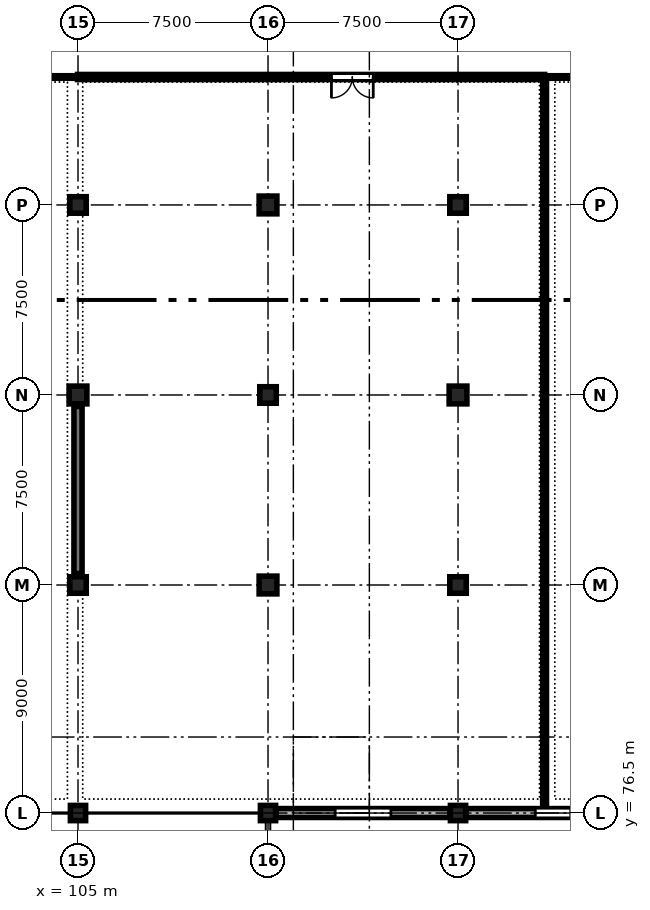
"""IFC4 building model, lengths in metres.
Left out: names, types, materials, properties, quantities, classifications, styles, units other than length and angle.
Written with IfcOpenShell. Run it as: python <this file> out.ifc"""

import sys

from ifc_helpers import new_model, si_unit, direction, frame, frame_2d, origin, origin_2d, place, context, subcontext, project, spatial, rectangle, circle, extrude, element, fill, save


model = new_model("IFC4")
c1 = context("Model", 3, precision=1e-05, world=origin(), true_north=direction((0.0, 1.0)))
c2 = subcontext(c1, "Body", "Model", "MODEL_VIEW")
j1 = project(units=[si_unit("LENGTHUNIT", "METRE"), si_unit("PLANEANGLEUNIT", "RADIAN")], contexts=[c1])
p1 = place(None, origin())
s1 = spatial("IfcSite", under=j1, at=p1, CompositionType="ELEMENT")
p2 = place(p1, origin())
s2 = spatial("IfcBuilding", under=s1, at=p2, CompositionType="ELEMENT")
p3 = place(p2, frame((0.0, 0.0, 4.8)))
s3 = spatial("IfcBuildingStorey", under=s2, at=p3, CompositionType="ELEMENT", Elevation=4.8)
p4 = place(p3, frame((105.0, 76.5, 0.0), z_axis=(0.0, 0.0, 1.0), x_axis=(1.0, 0.0, 0.0)))
e1 = element("IfcColumn", 1, at=p4, inside=s3, PredefinedType="COLUMN", context=c2, shape_type="SweptSolid", body=[
    extrude(circle(Radius=0.3, at=origin_2d()), origin(), (0.0, 0.0, 1.0), 4.5),
])
p5 = place(p3, frame((105.0, 85.5, 0.0), z_axis=(0.0, 0.0, 1.0), x_axis=(1.0, 0.0, 0.0)))
e2 = element("IfcColumn", 2, at=p5, inside=s3, PredefinedType="COLUMN", context=c2, shape_type="SweptSolid", body=[
    extrude(rectangle(XDim=0.65, YDim=0.65, at=origin_2d()), origin(), (0.0, 0.0, 1.0), 4.5),
])
p6 = place(p3, frame((105.0, 93.0, 0.0), z_axis=(0.0, 0.0, 1.0), x_axis=(1.0, 0.0, 0.0)))
e3 = element("IfcColumn", 3, at=p6, inside=s3, PredefinedType="COLUMN", context=c2, shape_type="SweptSolid", body=[
    extrude(rectangle(XDim=0.7, YDim=0.7, at=origin_2d()), origin(), (0.0, 0.0, 1.0), 4.5),
])
p7 = place(p3, frame((105.0, 100.5, 0.0), z_axis=(0.0, 0.0, 1.0), x_axis=(1.0, 0.0, 0.0)))
e4 = element("IfcColumn", 4, at=p7, inside=s3, PredefinedType="COLUMN", context=c2, shape_type="SweptSolid", body=[
    extrude(rectangle(XDim=0.65, YDim=0.65, at=origin_2d()), origin(), (0.0, 0.0, 1.0), 4.5),
])
p8 = place(p3, frame((112.5, 76.5, 0.0), z_axis=(0.0, 0.0, 1.0), x_axis=(1.0, 0.0, 0.0)))
e5 = element("IfcColumn", 5, at=p8, inside=s3, PredefinedType="COLUMN", context=c2, shape_type="SweptSolid", body=[
    extrude(rectangle(XDim=0.6, YDim=0.6, at=origin_2d()), origin(), (0.0, 0.0, 1.0), 4.5),
])
p9 = place(p3, frame((112.5, 85.5, 0.0), z_axis=(0.0, 0.0, 1.0), x_axis=(1.0, 0.0, 0.0)))
e6 = element("IfcColumn", 6, at=p9, inside=s3, PredefinedType="COLUMN", context=c2, shape_type="SweptSolid", body=[
    extrude(rectangle(XDim=0.7, YDim=0.7, at=origin_2d()), origin(), (0.0, 0.0, 1.0), 4.5),
])
p10 = place(p3, frame((112.5, 93.0, 0.0), z_axis=(0.0, 0.0, 1.0), x_axis=(1.0, 0.0, 0.0)))
e7 = element("IfcColumn", 7, at=p10, inside=s3, PredefinedType="COLUMN", context=c2, shape_type="SweptSolid", body=[
    extrude(rectangle(XDim=0.65, YDim=0.65, at=origin_2d()), origin(), (0.0, 0.0, 1.0), 4.5),
])
p11 = place(p3, frame((112.5, 100.5, 0.0), z_axis=(0.0, 0.0, 1.0), x_axis=(1.0, 0.0, 0.0)))
e8 = element("IfcColumn", 8, at=p11, inside=s3, PredefinedType="COLUMN", context=c2, shape_type="SweptSolid", body=[
    extrude(rectangle(XDim=0.7, YDim=0.7, at=origin_2d()), origin(), (0.0, 0.0, 1.0), 4.5),
])
p12 = place(p3, frame((120.0, 76.5, 0.0), z_axis=(0.0, 0.0, 1.0), x_axis=(1.0, 0.0, 0.0)))
e9 = element("IfcColumn", 9, at=p12, inside=s3, PredefinedType="COLUMN", context=c2, shape_type="SweptSolid", body=[
    extrude(rectangle(XDim=0.6, YDim=0.6, at=origin_2d()), origin(), (0.0, 0.0, 1.0), 4.5),
])
p13 = place(p3, frame((120.0, 85.5, 0.0), z_axis=(0.0, 0.0, 1.0), x_axis=(1.0, 0.0, 0.0)))
e10 = element("IfcColumn", 10, at=p13, inside=s3, PredefinedType="COLUMN", context=c2, shape_type="SweptSolid", body=[
    extrude(rectangle(XDim=0.65, YDim=0.65, at=origin_2d()), origin(), (0.0, 0.0, 1.0), 4.5),
])
p14 = place(p3, frame((120.0, 93.0, 0.0), z_axis=(0.0, 0.0, 1.0), x_axis=(1.0, 0.0, 0.0)))
e11 = element("IfcColumn", 11, at=p14, inside=s3, PredefinedType="COLUMN", context=c2, shape_type="SweptSolid", body=[
    extrude(rectangle(XDim=0.7, YDim=0.7, at=origin_2d()), origin(), (0.0, 0.0, 1.0), 4.5),
])
p15 = place(p3, frame((120.0, 100.5, 0.0), z_axis=(0.0, 0.0, 1.0), x_axis=(1.0, 0.0, 0.0)))
e12 = element("IfcColumn", 12, at=p15, inside=s3, PredefinedType="COLUMN", context=c2, shape_type="SweptSolid", body=[
    extrude(rectangle(XDim=0.65, YDim=0.65, at=origin_2d()), origin(), (0.0, 0.0, 1.0), 4.5),
])
p16 = place(p3, frame((105.0, 85.95, 0.0), z_axis=(0.0, 0.0, 1.0), x_axis=(0.0, 1.0, 0.0)))
e13 = element("IfcWall", 13, at=p16, inside=s3, PredefinedType="SHEAR", context=c2, shape_type="SweptSolid", body=[
    extrude(rectangle(XDim=6.6, YDim=0.32, at=frame_2d((3.3, 0.0))), origin(), (0.0, 0.0, 1.0), 3.63),
])
p17 = place(p3, frame((119.69, 76.5, 0.0), z_axis=(0.0, 0.0, 1.0), x_axis=(-1.0, 0.0, 0.0)))
e14 = element("IfcWall", 14, at=p17, inside=s3, PredefinedType="STANDARD", context=c2, shape_type="SweptSolid", body=[
    extrude(rectangle(XDim=6.88, YDim=0.35, at=frame_2d((3.44, 0.0))), origin(), (0.0, 0.0, 1.0), 3.63),
])
p18 = place(p17, frame((2.34, 0.0, 0.9)))
e15 = element("IfcOpeningElement", 15, at=p18, cuts=e14, PredefinedType="OPENING", context=c2, shape_type="SweptSolid", body=[
    extrude(rectangle(XDim=2.2, YDim=1.95, at=frame_2d((1.1, 0.975))), frame((0.0, 0.185, 0.0), z_axis=(0.0, -1.0, 0.0), x_axis=(1.0, 0.0, 0.0)), (0.0, 0.0, 1.0), 0.37),
])
p19 = place(p3, frame((127.19, 76.5, 0.0), z_axis=(0.0, 0.0, 1.0), x_axis=(-1.0, 0.0, 0.0)))
e16 = element("IfcWall", 16, at=p19, inside=s3, PredefinedType="STANDARD", context=c2, shape_type="SweptSolid", body=[
    extrude(rectangle(XDim=6.88, YDim=0.35, at=frame_2d((3.44, 0.0))), origin(), (0.0, 0.0, 1.0), 3.63),
])
p20 = place(p19, frame((2.74, 0.0, 0.9)))
e17 = element("IfcOpeningElement", 17, at=p20, cuts=e16, PredefinedType="OPENING", context=c2, shape_type="SweptSolid", body=[
    extrude(rectangle(XDim=1.4, YDim=1.8, at=frame_2d((0.7, 0.9))), frame((0.0, 0.185, 0.0), z_axis=(0.0, -1.0, 0.0), x_axis=(1.0, 0.0, 0.0)), (0.0, 0.0, 1.0), 0.37),
])
p21 = place(p3, frame((104.783, 105.55, 0.0), z_axis=(0.0, 0.0, 1.0), x_axis=(-1.0, 0.0, 0.0)))
e18 = element("IfcWall", 18, at=p21, inside=s3, PredefinedType="PARTITIONING", context=c2, shape_type="SweptSolid", body=[
    extrude(rectangle(XDim=18.433, YDim=0.1, at=frame_2d((9.217, 0.0))), origin(), (0.0, 0.0, 1.0), 4.165),
])
p22 = place(p21, frame((10.02, 0.0, 0.0)))
e19 = element("IfcOpeningElement", 19, at=p22, cuts=e18, PredefinedType="OPENING", context=c2, shape_type="SweptSolid", body=[
    extrude(rectangle(XDim=1.65, YDim=2.35, at=frame_2d((0.825, 1.175))), frame((0.0, 0.06, 0.0), z_axis=(0.0, -1.0, 0.0), x_axis=(1.0, 0.0, 0.0)), (0.0, 0.0, 1.0), 0.12),
])
p23 = place(p3, frame((123.417, 105.55, 0.0), z_axis=(0.0, 0.0, 1.0), x_axis=(-1.0, 0.0, 0.0)))
e20 = element("IfcWall", 20, at=p23, inside=s3, PredefinedType="STANDARD", context=c2, shape_type="SweptSolid", body=[
    extrude(rectangle(XDim=18.433, YDim=0.2, at=frame_2d((9.217, 0.0))), origin(), (0.0, 0.0, 1.0), 4.165),
])
p24 = place(p23, frame((6.763, 0.0, 0.0)))
e21 = element("IfcOpeningElement", 21, at=p24, cuts=e20, PredefinedType="OPENING", context=c2, shape_type="SweptSolid", body=[
    extrude(rectangle(XDim=1.65, YDim=2.35, at=frame_2d((0.825, 1.175))), frame((0.0, 0.11, 0.0), z_axis=(0.0, -1.0, 0.0), x_axis=(1.0, 0.0, 0.0)), (0.0, 0.0, 1.0), 0.22),
])
p25 = place(p3, frame((142.05, 105.55, 0.0), z_axis=(0.0, 0.0, 1.0), x_axis=(-1.0, 0.0, 0.0)))
e22 = element("IfcWall", 22, at=p25, inside=s3, PredefinedType="PARTITIONING", context=c2, shape_type="SweptSolid", body=[
    extrude(rectangle(XDim=18.433, YDim=0.1, at=frame_2d((9.217, 0.0))), origin(), (0.0, 0.0, 1.0), 4.165),
])
p26 = place(p25, frame((10.02, 0.0, 0.0)))
e23 = element("IfcOpeningElement", 23, at=p26, cuts=e22, PredefinedType="OPENING", context=c2, shape_type="SweptSolid", body=[
    extrude(rectangle(XDim=1.65, YDim=2.35, at=frame_2d((0.825, 1.175))), frame((0.0, 0.06, 0.0), z_axis=(0.0, -1.0, 0.0), x_axis=(1.0, 0.0, 0.0)), (0.0, 0.0, 1.0), 0.12),
])
p27 = place(p3, frame((123.417, 76.85, 0.0), z_axis=(0.0, 0.0, 1.0), x_axis=(0.0, 1.0, 0.0)))
e24 = element("IfcWall", 24, at=p27, inside=s3, PredefinedType="PARTITIONING", context=c2, shape_type="SweptSolid", body=[
    extrude(rectangle(XDim=28.7, YDim=0.15, at=frame_2d((14.35, 0.0))), origin(), (0.0, 0.0, 1.0), 3.765),
])
p28 = place(p18, origin())
e25 = element("IfcWindow", 25, at=p28, inside=s3, PartitioningType="SINGLE_PANEL", PredefinedType="WINDOW", context=c2, shape_type="SweptSolid", body=[
    extrude(rectangle(XDim=2.2, YDim=1.95, at=frame_2d((1.1, 0.975))), frame((0.0, 0.03, 0.0), z_axis=(0.0, -1.0, 0.0), x_axis=(1.0, 0.0, 0.0)), (0.0, 0.0, 1.0), 0.06),
])
fill(e15, e25)
p29 = place(p20, origin())
e26 = element("IfcWindow", 26, at=p29, inside=s3, PartitioningType="SINGLE_PANEL", PredefinedType="WINDOW", context=c2, shape_type="SweptSolid", body=[
    extrude(rectangle(XDim=1.4, YDim=1.8, at=frame_2d((0.7, 0.9))), frame((0.0, 0.03, 0.0), z_axis=(0.0, -1.0, 0.0), x_axis=(1.0, 0.0, 0.0)), (0.0, 0.0, 1.0), 0.06),
])
fill(e17, e26)
p30 = place(p24, origin())
e27 = element("IfcDoor", 27, at=p30, inside=s3, OperationType="DOUBLE_DOOR_SINGLE_SWING", PredefinedType="DOOR", context=c2, shape_type="SweptSolid", body=[
    extrude(rectangle(XDim=1.65, YDim=2.35, at=frame_2d((0.825, 1.175))), frame((0.0, 0.025, 0.0), z_axis=(0.0, -1.0, 0.0), x_axis=(1.0, 0.0, 0.0)), (0.0, 0.0, 1.0), 0.05),
])
fill(e21, e27)
save(model, sys.argv[1])
